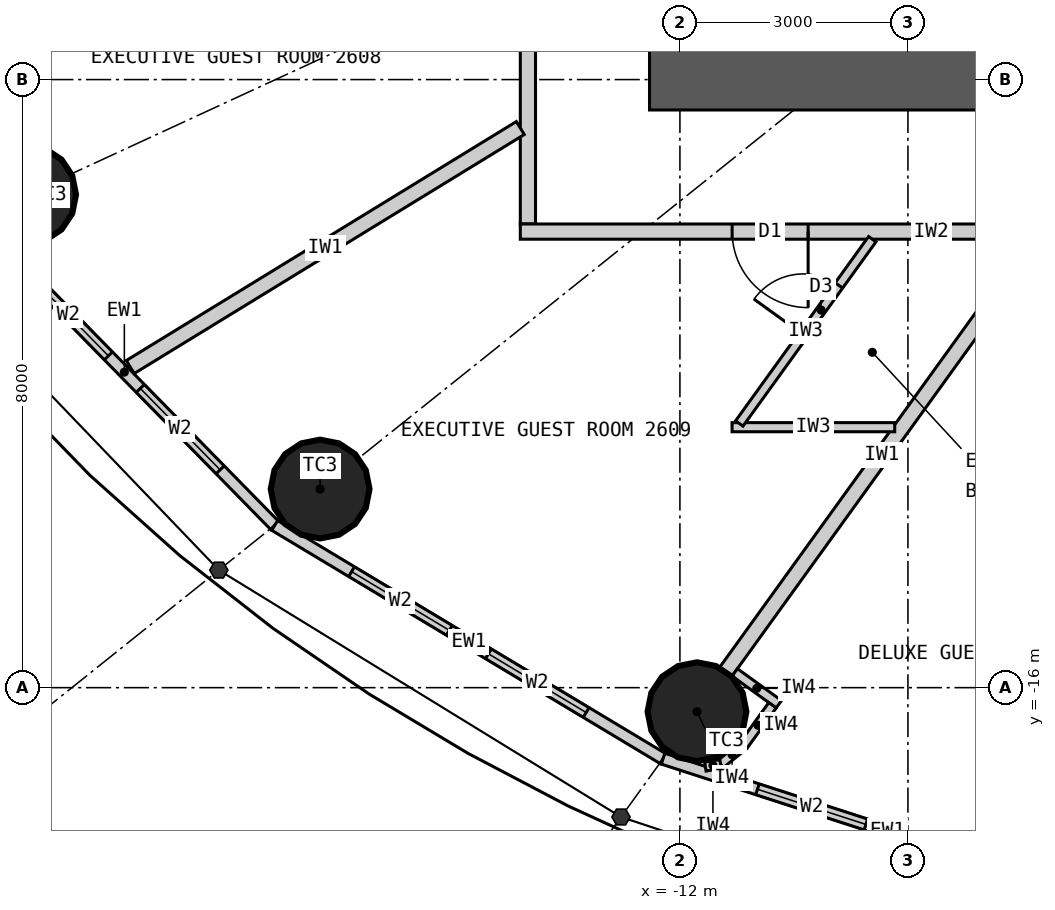
"""IFC4 building model, lengths in metres.
Left out: names, types, materials, properties, quantities, classifications, styles, units other than length and angle.
Written with IfcOpenShell. Run it as: python <this file> out.ifc"""

import sys

from ifc_helpers import new_model, si_unit, direction, frame, frame_2d, origin, origin_2d, place, context, subcontext, project, spatial, rectangle, circle, extrude, element, fill, save


model = new_model("IFC4")
c1 = context("Model", 3, precision=1e-05, world=origin(), true_north=direction((0.0, 1.0)))
c2 = subcontext(c1, "Body", "Model", "MODEL_VIEW")
j1 = project(units=[si_unit("LENGTHUNIT", "METRE"), si_unit("PLANEANGLEUNIT", "RADIAN")], contexts=[c1])
p1 = place(None, origin())
s1 = spatial("IfcSite", under=j1, at=p1, CompositionType="ELEMENT")
p2 = place(p1, origin())
s2 = spatial("IfcBuilding", under=s1, at=p2, CompositionType="ELEMENT")
p3 = place(p2, frame((0.0, 0.0, 105.6)))
s3 = spatial("IfcBuildingStorey", under=s2, at=p3, CompositionType="ELEMENT", Elevation=105.6)
for number, where, z_axis, x_axis in (
    (1, (-20.596, -9.513, 0.0), (0.0, 0.0, 1.0), (1.0, 0.0, 0.0)),
    (2, (-16.734, -13.387, 0.0), (0.0, 0.0, 1.0), (1.0, 0.0, 0.0)),
    (3, (-11.775, -16.316, 0.0), (0.0, 0.0, 1.0), (1.0, 0.0, 0.0)),
):
    element("IfcColumn", number, at=place(p3, frame(where, z_axis=z_axis, x_axis=x_axis)), inside=s3, PredefinedType="COLUMN", context=c2, shape_type="SweptSolid", body=[
        extrude(circle(Radius=0.65, at=origin_2d()), origin(), (0.0, 0.0, 1.0), 3.3),
    ])
p4 = place(p3, frame((12.4, -8.0, 0.0), z_axis=(0.0, 0.0, 1.0), x_axis=(-1.0, 0.0, 0.0)))
e4 = element("IfcWall", 4, at=p4, inside=s3, PredefinedType="SHEAR", context=c2, shape_type="SweptSolid", body=[
    extrude(rectangle(XDim=24.8, YDim=0.8, at=frame_2d((12.4, 0.0))), origin(), (0.0, 0.0, 1.0), 3.3),
])
p5 = place(p4, frame((11.1, 0.0, 0.0)))
e5 = element("IfcOpeningElement", 5, at=p5, cuts=e4, PredefinedType="OPENING", context=c2, shape_type="SweptSolid", body=[
    extrude(rectangle(XDim=1.2, YDim=2.2, at=frame_2d((0.6, 1.1))), frame((0.0, 0.41, 0.0), z_axis=(0.0, -1.0, 0.0), x_axis=(1.0, 0.0, 0.0)), (0.0, 0.0, 1.0), 0.82),
])
p6 = place(p4, frame((18.7, 0.0, 0.0)))
e6 = element("IfcOpeningElement", 6, at=p6, cuts=e4, PredefinedType="OPENING", context=c2, shape_type="SweptSolid", body=[
    extrude(rectangle(XDim=0.9, YDim=2.2, at=frame_2d((0.45, 1.1))), frame((0.0, 0.41, 0.0), z_axis=(0.0, -1.0, 0.0), x_axis=(1.0, 0.0, 0.0)), (0.0, 0.0, 1.0), 0.82),
])
p7 = place(p3, frame((-21.287, -9.832, 0.0), z_axis=(0.0, 0.0, 1.0), x_axis=(0.700136650834, -0.714008872605, 0.0)))
e7 = element("IfcWall", 7, at=p7, inside=s3, PredefinedType="ELEMENTEDWALL", context=c2, shape_type="SweptSolid", body=[
    extrude(rectangle(XDim=5.649, YDim=0.15, at=frame_2d((2.825, 0.0))), origin(), (0.0, 0.0, 1.0), 3.12),
])
p8 = place(p7, frame((1.025, 0.0, 0.9)))
e8 = element("IfcOpeningElement", 8, at=p8, cuts=e7, PredefinedType="OPENING", context=c2, shape_type="SweptSolid", body=[
    extrude(rectangle(XDim=1.5, YDim=1.9, at=frame_2d((0.75, 0.95))), frame((0.0, 0.085, 0.0), z_axis=(0.0, -1.0, 0.0), x_axis=(1.0, 0.0, 0.0)), (0.0, 0.0, 1.0), 0.17),
])
p9 = place(p7, frame((3.125, 0.0, 0.9)))
e9 = element("IfcOpeningElement", 9, at=p9, cuts=e7, PredefinedType="OPENING", context=c2, shape_type="SweptSolid", body=[
    extrude(rectangle(XDim=1.5, YDim=1.9, at=frame_2d((0.75, 0.95))), frame((0.0, 0.085, 0.0), z_axis=(0.0, -1.0, 0.0), x_axis=(1.0, 0.0, 0.0)), (0.0, 0.0, 1.0), 0.17),
])
p10 = place(p3, frame((-17.332, -13.866, 0.0), z_axis=(0.0, 0.0, 1.0), x_axis=(0.857308573723, -0.514802884044, 0.0)))
e10 = element("IfcWall", 10, at=p10, inside=s3, PredefinedType="ELEMENTEDWALL", context=c2, shape_type="SweptSolid", body=[
    extrude(rectangle(XDim=5.961, YDim=0.15, at=frame_2d((2.98, 0.0))), origin(), (0.0, 0.0, 1.0), 3.12),
])
p11 = place(p10, frame((1.181, 0.0, 0.9)))
e11 = element("IfcOpeningElement", 11, at=p11, cuts=e10, PredefinedType="OPENING", context=c2, shape_type="SweptSolid", body=[
    extrude(rectangle(XDim=1.5, YDim=1.9, at=frame_2d((0.75, 0.95))), frame((0.0, 0.085, 0.0), z_axis=(0.0, -1.0, 0.0), x_axis=(1.0, 0.0, 0.0)), (0.0, 0.0, 1.0), 0.17),
])
p12 = place(p10, frame((3.281, 0.0, 0.9)))
e12 = element("IfcOpeningElement", 12, at=p12, cuts=e10, PredefinedType="OPENING", context=c2, shape_type="SweptSolid", body=[
    extrude(rectangle(XDim=1.5, YDim=1.9, at=frame_2d((0.75, 0.95))), frame((0.0, 0.085, 0.0), z_axis=(0.0, -1.0, 0.0), x_axis=(1.0, 0.0, 0.0)), (0.0, 0.0, 1.0), 0.17),
])
p13 = place(p3, frame((-12.221, -16.935, 0.0), z_axis=(0.0, 0.0, 1.0), x_axis=(0.951272691506, -0.308350881944, 0.0)))
e13 = element("IfcWall", 13, at=p13, inside=s3, PredefinedType="ELEMENTEDWALL", context=c2, shape_type="SweptSolid", body=[
    extrude(rectangle(XDim=6.211, YDim=0.15, at=frame_2d((3.105, 0.0))), origin(), (0.0, 0.0, 1.0), 3.12),
])
p14 = place(p13, frame((1.305, 0.0, 0.9)))
e14 = element("IfcOpeningElement", 14, at=p14, cuts=e13, PredefinedType="OPENING", context=c2, shape_type="SweptSolid", body=[
    extrude(rectangle(XDim=1.5, YDim=1.9, at=frame_2d((0.75, 0.95))), frame((0.0, 0.085, 0.0), z_axis=(0.0, -1.0, 0.0), x_axis=(1.0, 0.0, 0.0)), (0.0, 0.0, 1.0), 0.17),
])
p15 = place(p13, frame((3.405, 0.0, 0.9)))
e15 = element("IfcOpeningElement", 15, at=p15, cuts=e13, PredefinedType="OPENING", context=c2, shape_type="SweptSolid", body=[
    extrude(rectangle(XDim=1.5, YDim=1.9, at=frame_2d((0.75, 0.95))), frame((0.0, 0.085, 0.0), z_axis=(0.0, -1.0, 0.0), x_axis=(1.0, 0.0, 0.0)), (0.0, 0.0, 1.0), 0.17),
])
p16 = place(p3, frame((-14.0, 9.9, 0.0), z_axis=(0.0, 0.0, 1.0), x_axis=(0.0, -1.0, 0.0)))
e16 = element("IfcWall", 16, at=p16, inside=s3, PredefinedType="PARTITIONING", context=c2, shape_type="SweptSolid", body=[
    extrude(rectangle(XDim=19.8, YDim=0.2, at=frame_2d((9.9, 0.0))), origin(), (0.0, 0.0, 1.0), 3.12),
])
p17 = place(p16, frame((5.748, 0.0, 0.0)))
e17 = element("IfcOpeningElement", 17, at=p17, cuts=e16, PredefinedType="OPENING", context=c2, shape_type="SweptSolid", body=[
    extrude(rectangle(XDim=1.0, YDim=2.2, at=frame_2d((0.5, 1.1))), frame((0.0, 0.11, 0.0), z_axis=(0.0, -1.0, 0.0), x_axis=(1.0, 0.0, 0.0)), (0.0, 0.0, 1.0), 0.22),
])
p18 = place(p16, frame((10.778, 0.0, 0.0)))
e18 = element("IfcOpeningElement", 18, at=p18, cuts=e16, PredefinedType="OPENING", context=c2, shape_type="SweptSolid", body=[
    extrude(rectangle(XDim=1.0, YDim=2.2, at=frame_2d((0.5, 1.1))), frame((0.0, 0.11, 0.0), z_axis=(0.0, -1.0, 0.0), x_axis=(1.0, 0.0, 0.0)), (0.0, 0.0, 1.0), 0.22),
])
p19 = place(p16, frame((15.282, 0.0, 0.0)))
e19 = element("IfcOpeningElement", 19, at=p19, cuts=e16, PredefinedType="OPENING", context=c2, shape_type="SweptSolid", body=[
    extrude(rectangle(XDim=1.0, YDim=2.2, at=frame_2d((0.5, 1.1))), frame((0.0, 0.11, 0.0), z_axis=(0.0, -1.0, 0.0), x_axis=(1.0, 0.0, 0.0)), (0.0, 0.0, 1.0), 0.22),
])
p20 = place(p3, frame((-3.283, -10.0, 0.0), z_axis=(0.0, 0.0, 1.0), x_axis=(-1.0, 0.0, 0.0)))
e20 = element("IfcWall", 20, at=p20, inside=s3, PredefinedType="PARTITIONING", context=c2, shape_type="SweptSolid", body=[
    extrude(rectangle(XDim=10.817, YDim=0.2, at=frame_2d((5.409, 0.0))), origin(), (0.0, 0.0, 1.0), 3.12),
])
p21 = place(p20, frame((7.03, 0.0, 0.0)))
e21 = element("IfcOpeningElement", 21, at=p21, cuts=e20, PredefinedType="OPENING", context=c2, shape_type="SweptSolid", body=[
    extrude(rectangle(XDim=1.0, YDim=2.2, at=frame_2d((0.5, 1.1))), frame((0.0, 0.11, 0.0), z_axis=(0.0, -1.0, 0.0), x_axis=(1.0, 0.0, 0.0)), (0.0, 0.0, 1.0), 0.22),
])
p22 = place(p3, frame((-14.1, -8.638, 0.0), z_axis=(0.0, 0.0, 1.0), x_axis=(-0.852706758009, -0.5223898782, 0.0)))
e22 = element("IfcWall", 22, at=p22, inside=s3, PredefinedType="PARTITIONING", context=c2, shape_type="SweptSolid", body=[
    extrude(rectangle(XDim=6.019, YDim=0.2, at=frame_2d((3.009, 0.0))), origin(), (0.0, 0.0, 1.0), 3.12),
])
p23 = place(p3, frame((-7.289, -10.1, 0.0), z_axis=(0.0, 0.0, 1.0), x_axis=(-0.585217367024, -0.81087645997, 0.0)))
e23 = element("IfcWall", 23, at=p23, inside=s3, PredefinedType="PARTITIONING", context=c2, shape_type="SweptSolid", body=[
    extrude(rectangle(XDim=7.016, YDim=0.2, at=frame_2d((3.508, 0.0))), origin(), (0.0, 0.0, 1.0), 2.27),
])
p24 = place(p3, frame((-9.174, -12.573, 0.0), z_axis=(0.0, 0.0, 1.0), x_axis=(-1.0, 0.0, 0.0)))
e24 = element("IfcWall", 24, at=p24, inside=s3, PredefinedType="PARTITIONING", context=c2, shape_type="SweptSolid", body=[
    extrude(rectangle(XDim=2.14, YDim=0.12, at=frame_2d((1.07, 0.0))), origin(), (0.0, 0.0, 1.0), 3.12),
])
p25 = place(p3, frame((-9.469, -10.1, 0.0), z_axis=(0.0, 0.0, 1.0), x_axis=(-0.58520133861, -0.81088802759, 0.0)))
e25 = element("IfcWall", 25, at=p25, inside=s3, PredefinedType="PARTITIONING", context=c2, shape_type="SweptSolid", body=[
    extrude(rectangle(XDim=2.99, YDim=0.12, at=frame_2d((1.495, 0.0))), origin(), (0.0, 0.0, 1.0), 3.12),
])
p26 = place(p25, frame((0.75, 0.0, 0.0)))
e26 = element("IfcOpeningElement", 26, at=p26, cuts=e25, PredefinedType="OPENING", context=c2, shape_type="SweptSolid", body=[
    extrude(rectangle(XDim=0.8, YDim=2.1, at=frame_2d((0.4, 1.05))), frame((0.0, 0.07, 0.0), z_axis=(0.0, -1.0, 0.0), x_axis=(1.0, 0.0, 0.0)), (0.0, 0.0, 1.0), 0.14),
])
p27 = place(p3, frame((-11.279, -15.799, 0.0), z_axis=(0.0, 0.0, 1.0), x_axis=(0.810912957127, -0.585166793285, 0.0)))
e27 = element("IfcWall", 27, at=p27, inside=s3, PredefinedType="PARTITIONING", context=c2, shape_type="SweptSolid", body=[
    extrude(rectangle(XDim=0.716, YDim=0.12, at=frame_2d((0.358, 0.0))), origin(), (0.0, 0.0, 1.0), 3.12),
])
p28 = place(p3, frame((-10.782, -16.231, 0.0), z_axis=(0.0, 0.0, 1.0), x_axis=(-0.585175102182, -0.810906961239, 0.0)))
e28 = element("IfcWall", 28, at=p28, inside=s3, PredefinedType="PARTITIONING", context=c2, shape_type="SweptSolid", body=[
    extrude(rectangle(XDim=0.65, YDim=0.12, at=frame_2d((0.325, 0.0))), origin(), (0.0, 0.0, 1.0), 3.12),
])
p29 = place(p3, frame((-11.162, -16.759, 0.0), z_axis=(0.0, 0.0, 1.0), x_axis=(-0.775178428527, -0.63174235567, 0.0)))
e29 = element("IfcWall", 29, at=p29, inside=s3, PredefinedType="PARTITIONING", context=c2, shape_type="SweptSolid", body=[
    extrude(rectangle(XDim=0.392, YDim=0.12, at=frame_2d((0.196, 0.0))), origin(), (0.0, 0.0, 1.0), 3.12),
])
p30 = place(p3, frame((-11.466, -17.006, 0.0), z_axis=(0.0, 0.0, 1.0), x_axis=(-0.987228877621, -0.15930832744, 0.0)))
e30 = element("IfcWall", 30, at=p30, inside=s3, PredefinedType="PARTITIONING", context=c2, shape_type="SweptSolid", body=[
    extrude(rectangle(XDim=0.202, YDim=0.12, at=frame_2d((0.101, 0.0))), origin(), (0.0, 0.0, 1.0), 3.12),
])
p31 = place(p8, origin())
e31 = element("IfcWindow", 31, at=p31, inside=s3, PartitioningType="SINGLE_PANEL", PredefinedType="WINDOW", context=c2, shape_type="SweptSolid", body=[
    extrude(rectangle(XDim=1.5, YDim=1.9, at=frame_2d((0.75, 0.95))), frame((0.0, 0.03, 0.0), z_axis=(0.0, -1.0, 0.0), x_axis=(1.0, 0.0, 0.0)), (0.0, 0.0, 1.0), 0.06),
])
fill(e8, e31)
p32 = place(p9, origin())
e32 = element("IfcWindow", 32, at=p32, inside=s3, PartitioningType="SINGLE_PANEL", PredefinedType="WINDOW", context=c2, shape_type="SweptSolid", body=[
    extrude(rectangle(XDim=1.5, YDim=1.9, at=frame_2d((0.75, 0.95))), frame((0.0, 0.03, 0.0), z_axis=(0.0, -1.0, 0.0), x_axis=(1.0, 0.0, 0.0)), (0.0, 0.0, 1.0), 0.06),
])
fill(e9, e32)
p33 = place(p11, origin())
e33 = element("IfcWindow", 33, at=p33, inside=s3, PartitioningType="SINGLE_PANEL", PredefinedType="WINDOW", context=c2, shape_type="SweptSolid", body=[
    extrude(rectangle(XDim=1.5, YDim=1.9, at=frame_2d((0.75, 0.95))), frame((0.0, 0.03, 0.0), z_axis=(0.0, -1.0, 0.0), x_axis=(1.0, 0.0, 0.0)), (0.0, 0.0, 1.0), 0.06),
])
fill(e11, e33)
p34 = place(p12, origin())
e34 = element("IfcWindow", 34, at=p34, inside=s3, PartitioningType="SINGLE_PANEL", PredefinedType="WINDOW", context=c2, shape_type="SweptSolid", body=[
    extrude(rectangle(XDim=1.5, YDim=1.9, at=frame_2d((0.75, 0.95))), frame((0.0, 0.03, 0.0), z_axis=(0.0, -1.0, 0.0), x_axis=(1.0, 0.0, 0.0)), (0.0, 0.0, 1.0), 0.06),
])
fill(e12, e34)
p35 = place(p14, origin())
e35 = element("IfcWindow", 35, at=p35, inside=s3, PartitioningType="SINGLE_PANEL", PredefinedType="WINDOW", context=c2, shape_type="SweptSolid", body=[
    extrude(rectangle(XDim=1.5, YDim=1.9, at=frame_2d((0.75, 0.95))), frame((0.0, 0.03, 0.0), z_axis=(0.0, -1.0, 0.0), x_axis=(1.0, 0.0, 0.0)), (0.0, 0.0, 1.0), 0.06),
])
fill(e14, e35)
p36 = place(p26, origin())
e36 = element("IfcDoor", 36, at=p36, inside=s3, OperationType="SINGLE_SWING_RIGHT", PredefinedType="DOOR", context=c2, shape_type="SweptSolid", body=[
    extrude(rectangle(XDim=0.8, YDim=2.1, at=frame_2d((0.4, 1.05))), frame((0.0, 0.025, 0.0), z_axis=(0.0, -1.0, 0.0), x_axis=(1.0, 0.0, 0.0)), (0.0, 0.0, 1.0), 0.05),
])
fill(e26, e36)
p37 = place(p21, origin())
e37 = element("IfcDoor", 37, at=p37, inside=s3, OperationType="SINGLE_SWING_LEFT", PredefinedType="DOOR", context=c2, shape_type="SweptSolid", body=[
    extrude(rectangle(XDim=1.0, YDim=2.2, at=frame_2d((0.5, 1.1))), frame((0.0, 0.025, 0.0), z_axis=(0.0, -1.0, 0.0), x_axis=(1.0, 0.0, 0.0)), (0.0, 0.0, 1.0), 0.05),
])
fill(e21, e37)
save(model, sys.argv[1])
